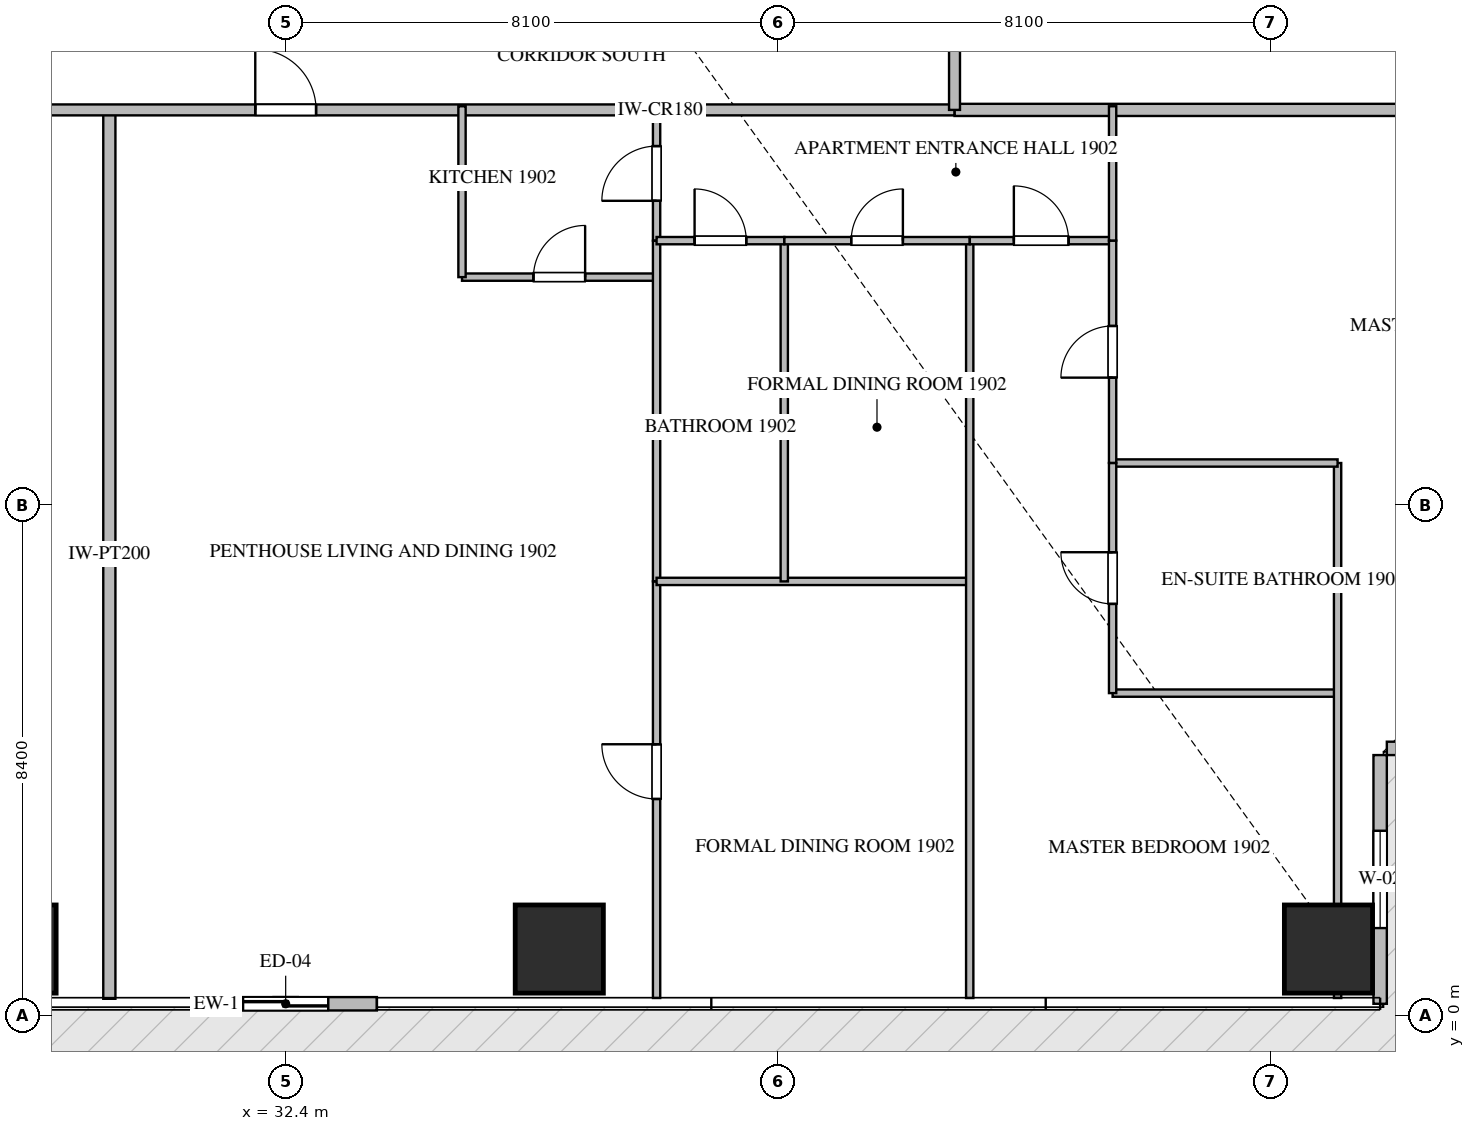
"""IFC4 building model, lengths in metres.
Left out: names, types, materials, properties, quantities, classifications, styles, units other than length and angle.
Written with IfcOpenShell. Run it as: python <this file> out.ifc"""

import sys

from ifc_helpers import new_model, si_unit, direction, frame, frame_2d, origin, origin_2d, place, context, subcontext, project, spatial, rectangle, extrude, source, transform, mapped, element, fill, save


model = new_model("IFC4")
c1 = context("Model", 3, precision=1e-05, world=origin(), true_north=direction((0.0, 1.0)))
c2 = subcontext(c1, "Body", "Model", "MODEL_VIEW")
j1 = project(units=[si_unit("LENGTHUNIT", "METRE"), si_unit("PLANEANGLEUNIT", "RADIAN")], contexts=[c1])
p1 = place(None, origin())
s1 = spatial("IfcSite", under=j1, at=p1, CompositionType="ELEMENT")
p2 = place(p1, origin())
s2 = spatial("IfcBuilding", under=s1, at=p2, CompositionType="ELEMENT")
p3 = place(p2, frame((0.0, 0.0, 79.2)))
s3 = spatial("IfcBuildingStorey", under=s2, at=p3, CompositionType="ELEMENT", Elevation=79.2)
m1 = source(origin(), c2, "Body", "SweptSolid", [
    extrude(rectangle(XDim=1.45, YDim=1.45, at=origin_2d()), origin(), (0.0, 0.0, 1.0), 3.75),
])
for number, where, z_axis, x_axis in (
    (1, (27.9, 1.1, -0.26), (0.0, 0.0, 1.0), (1.0, 0.0, 0.0)),
    (2, (36.9, 1.1, -0.26), (0.0, 0.0, 1.0), (1.0, 0.0, 0.0)),
    (3, (49.55, 1.1, -0.26), (0.0, 0.0, 1.0), (1.0, 0.0, 0.0)),
):
    element("IfcColumn", number, at=place(p3, frame(where, z_axis=z_axis, x_axis=x_axis)), inside=s3, PredefinedType="COLUMN", context=c2, shape_type="MappedRepresentation", body=[
        mapped(m1, transform((0.0, 0.0, 0.0), scale=1.0)),
    ])
p4 = place(p3, frame((30.9, 0.2, 0.0), z_axis=(0.0, 0.0, 1.0), x_axis=(1.0, 0.0, 0.0)))
e4 = element("IfcWall", 4, at=p4, inside=s3, PredefinedType="ELEMENTEDWALL", context=c2, shape_type="SweptSolid", body=[
    extrude(rectangle(XDim=3.0, YDim=0.22, at=frame_2d((1.5, 0.0))), origin(), (0.0, 0.0, 1.0), 3.475),
])
p5 = place(p4, frame((0.8, 0.0, 0.0)))
e5 = element("IfcOpeningElement", 5, at=p5, cuts=e4, PredefinedType="OPENING", context=c2, shape_type="SweptSolid", body=[
    extrude(rectangle(XDim=1.4, YDim=2.25, at=frame_2d((0.7, 1.125))), frame((0.0, 0.12, 0.0), z_axis=(0.0, -1.0, 0.0), x_axis=(1.0, 0.0, 0.0)), (0.0, 0.0, 1.0), 0.24),
])
p6 = place(p3, frame((50.4, 0.2, 0.0), z_axis=(0.0, 0.0, 1.0), x_axis=(0.0, 1.0, 0.0)))
e6 = element("IfcWall", 6, at=p6, inside=s3, PredefinedType="ELEMENTEDWALL", context=c2, shape_type="SweptSolid", body=[
    extrude(rectangle(XDim=4.09, YDim=0.22, at=frame_2d((2.045, 0.0))), origin(), (0.0, 0.0, 1.0), 3.475),
])
p7 = place(p6, frame((1.245, 0.0, 0.65)))
e7 = element("IfcOpeningElement", 7, at=p7, cuts=e6, PredefinedType="OPENING", context=c2, shape_type="SweptSolid", body=[
    extrude(rectangle(XDim=1.6, YDim=2.1, at=frame_2d((0.8, 1.05))), frame((0.0, 0.12, 0.0), z_axis=(0.0, -1.0, 0.0), x_axis=(1.0, 0.0, 0.0)), (0.0, 0.0, 1.0), 0.24),
])
p8 = place(p3, frame((50.51, 4.4, 0.0), z_axis=(0.0, 0.0, 1.0), x_axis=(1.0, 0.0, 0.0)))
e8 = element("IfcWall", 8, at=p8, inside=s3, PredefinedType="ELEMENTEDWALL", context=c2, shape_type="SweptSolid", body=[
    extrude(rectangle(XDim=3.98, YDim=0.22, at=frame_2d((1.99, 0.0))), origin(), (0.0, 0.0, 1.0), 3.475),
])
p9 = place(p8, frame((1.19, 0.0, 0.65)))
e9 = element("IfcOpeningElement", 9, at=p9, cuts=e8, PredefinedType="OPENING", context=c2, shape_type="SweptSolid", body=[
    extrude(rectangle(XDim=1.6, YDim=2.1, at=frame_2d((0.8, 1.05))), frame((0.0, 0.12, 0.0), z_axis=(0.0, -1.0, 0.0), x_axis=(1.0, 0.0, 0.0)), (0.0, 0.0, 1.0), 0.24),
])
p10 = place(p3, frame((29.5, 0.282, 0.0), z_axis=(0.0, 0.0, 1.0), x_axis=(0.0, 1.0, 0.0)))
e10 = element("IfcWall", 10, at=p10, inside=s3, PredefinedType="PARTITIONING", context=c2, shape_type="SweptSolid", body=[
    extrude(rectangle(XDim=14.618, YDim=0.2, at=frame_2d((7.309, 0.0))), origin(), (0.0, 0.0, 1.0), 3.49),
])
p11 = place(p3, frame((43.4, 14.9, 0.0), z_axis=(0.0, 0.0, 1.0), x_axis=(1.0, 0.0, 0.0)))
e11 = element("IfcWall", 11, at=p11, inside=s3, PredefinedType="PARTITIONING", context=c2, shape_type="SweptSolid", body=[
    extrude(rectangle(XDim=15.318, YDim=0.2, at=frame_2d((7.659, 0.0))), origin(), (0.0, 0.0, 1.0), 3.49),
])
p12 = place(p3, frame((21.402, 14.9, 0.0), z_axis=(0.0, 0.0, 1.0), x_axis=(1.0, 0.0, 0.0)))
e12 = element("IfcWall", 12, at=p12, inside=s3, PredefinedType="PARTITIONING", context=c2, shape_type="SweptSolid", body=[
    extrude(rectangle(XDim=21.996, YDim=0.18, at=frame_2d((10.998, 0.0))), origin(), (0.0, 0.0, 1.0), 3.49),
])
p13 = place(p12, frame((4.724, 0.0, 0.0)))
e13 = element("IfcOpeningElement", 13, at=p13, cuts=e12, PredefinedType="OPENING", context=c2, shape_type="SweptSolid", body=[
    extrude(rectangle(XDim=1.0, YDim=2.15, at=frame_2d((0.5, 1.075))), frame((0.0, 0.1, 0.0), z_axis=(0.0, -1.0, 0.0), x_axis=(1.0, 0.0, 0.0)), (0.0, 0.0, 1.0), 0.2),
])
p14 = place(p12, frame((10.498, 0.0, 0.0)))
e14 = element("IfcOpeningElement", 14, at=p14, cuts=e12, PredefinedType="OPENING", context=c2, shape_type="SweptSolid", body=[
    extrude(rectangle(XDim=1.0, YDim=2.15, at=frame_2d((0.5, 1.075))), frame((0.0, 0.1, 0.0), z_axis=(0.0, -1.0, 0.0), x_axis=(1.0, 0.0, 0.0)), (0.0, 0.0, 1.0), 0.2),
])
p15 = place(p3, frame((43.4, 14.9, 0.0), z_axis=(0.0, 0.0, 1.0), x_axis=(0.0, 1.0, 0.0)))
e15 = element("IfcWall", 15, at=p15, inside=s3, PredefinedType="PARTITIONING", context=c2, shape_type="SweptSolid", body=[
    extrude(rectangle(XDim=20.6, YDim=0.18, at=frame_2d((10.3, 0.0))), origin(), (0.0, 0.0, 1.0), 3.49),
])
p16 = place(p15, frame((1.96, 0.0, 0.0)))
e16 = element("IfcOpeningElement", 16, at=p16, cuts=e15, PredefinedType="OPENING", context=c2, shape_type="SweptSolid", body=[
    extrude(rectangle(XDim=1.0, YDim=2.15, at=frame_2d((0.5, 1.075))), frame((0.0, 0.1, 0.0), z_axis=(0.0, -1.0, 0.0), x_axis=(1.0, 0.0, 0.0)), (0.0, 0.0, 1.0), 0.2),
])
p17 = place(p3, frame((35.3, 12.15, 0.0), z_axis=(0.0, 0.0, 1.0), x_axis=(1.0, 0.0, 0.0)))
e17 = element("IfcWall", 17, at=p17, inside=s3, PredefinedType="PARTITIONING", context=c2, shape_type="SweptSolid", body=[
    extrude(rectangle(XDim=3.2, YDim=0.12, at=frame_2d((1.6, 0.0))), origin(), (0.0, 0.0, 1.0), 3.49),
])
p18 = place(p17, frame((1.175, 0.0, 0.0)))
e18 = element("IfcOpeningElement", 18, at=p18, cuts=e17, PredefinedType="OPENING", context=c2, shape_type="SweptSolid", body=[
    extrude(rectangle(XDim=0.85, YDim=2.1, at=frame_2d((0.425, 1.05))), frame((0.0, 0.07, 0.0), z_axis=(0.0, -1.0, 0.0), x_axis=(1.0, 0.0, 0.0)), (0.0, 0.0, 1.0), 0.14),
])
p19 = place(p3, frame((35.3, 12.15, 0.0), z_axis=(0.0, 0.0, 1.0), x_axis=(0.0, 1.0, 0.0)))
e19 = element("IfcWall", 19, at=p19, inside=s3, PredefinedType="PARTITIONING", context=c2, shape_type="SweptSolid", body=[
    extrude(rectangle(XDim=2.81, YDim=0.12, at=frame_2d((1.405, 0.0))), origin(), (0.0, 0.0, 1.0), 3.49),
])
p20 = place(p3, frame((38.5, 12.75, 0.0), z_axis=(0.0, 0.0, 1.0), x_axis=(0.0, 1.0, 0.0)))
e20 = element("IfcWall", 20, at=p20, inside=s3, PredefinedType="PARTITIONING", context=c2, shape_type="SweptSolid", body=[
    extrude(rectangle(XDim=2.21, YDim=0.12, at=frame_2d((1.105, 0.0))), origin(), (0.0, 0.0, 1.0), 3.49),
])
p21 = place(p20, frame((0.655, 0.0, 0.0)))
e21 = element("IfcOpeningElement", 21, at=p21, cuts=e20, PredefinedType="OPENING", context=c2, shape_type="SweptSolid", body=[
    extrude(rectangle(XDim=0.9, YDim=2.1, at=frame_2d((0.45, 1.05))), frame((0.0, 0.07, 0.0), z_axis=(0.0, -1.0, 0.0), x_axis=(1.0, 0.0, 0.0)), (0.0, 0.0, 1.0), 0.14),
])
p22 = place(p3, frame((38.5, 0.295, 0.0), z_axis=(0.0, 0.0, 1.0), x_axis=(0.0, 1.0, 0.0)))
e22 = element("IfcWall", 22, at=p22, inside=s3, PredefinedType="PARTITIONING", context=c2, shape_type="SweptSolid", body=[
    extrude(rectangle(XDim=6.851, YDim=0.12, at=frame_2d((3.426, 0.0))), origin(), (0.0, 0.0, 1.0), 3.49),
])
p23 = place(p22, frame((3.273, 0.0, 0.0)))
e23 = element("IfcOpeningElement", 23, at=p23, cuts=e22, PredefinedType="OPENING", context=c2, shape_type="SweptSolid", body=[
    extrude(rectangle(XDim=0.9, YDim=2.1, at=frame_2d((0.45, 1.05))), frame((0.0, 0.07, 0.0), z_axis=(0.0, -1.0, 0.0), x_axis=(1.0, 0.0, 0.0)), (0.0, 0.0, 1.0), 0.14),
])
p24 = place(p3, frame((38.5, 7.148, 0.0), z_axis=(0.0, 0.0, 1.0), x_axis=(0.0, 1.0, 0.0)))
e24 = element("IfcWall", 24, at=p24, inside=s3, PredefinedType="PARTITIONING", context=c2, shape_type="SweptSolid", body=[
    extrude(rectangle(XDim=5.6, YDim=0.12, at=frame_2d((2.8, 0.0))), origin(), (0.0, 0.0, 1.0), 3.49),
])
p25 = place(p3, frame((38.5, 7.146, 0.0), z_axis=(0.0, 0.0, 1.0), x_axis=(1.0, 0.0, 0.0)))
e25 = element("IfcWall", 25, at=p25, inside=s3, PredefinedType="PARTITIONING", context=c2, shape_type="SweptSolid", body=[
    extrude(rectangle(XDim=5.15, YDim=0.12, at=frame_2d((2.575, 0.0))), origin(), (0.0, 0.0, 1.0), 3.49),
])
p26 = place(p3, frame((43.65, 0.295, 0.0), z_axis=(0.0, 0.0, 1.0), x_axis=(0.0, 1.0, 0.0)))
e26 = element("IfcWall", 26, at=p26, inside=s3, PredefinedType="PARTITIONING", context=c2, shape_type="SweptSolid", body=[
    extrude(rectangle(XDim=12.455, YDim=0.12, at=frame_2d((6.228, 0.0))), origin(), (0.0, 0.0, 1.0), 3.49),
])
p27 = place(p3, frame((40.6, 7.146, 0.0), z_axis=(0.0, 0.0, 1.0), x_axis=(0.0, 1.0, 0.0)))
e27 = element("IfcWall", 27, at=p27, inside=s3, PredefinedType="PARTITIONING", context=c2, shape_type="SweptSolid", body=[
    extrude(rectangle(XDim=5.604, YDim=0.12, at=frame_2d((2.802, 0.0))), origin(), (0.0, 0.0, 1.0), 3.49),
])
p28 = place(p3, frame((38.5, 12.75, 0.0), z_axis=(0.0, 0.0, 1.0), x_axis=(1.0, 0.0, 0.0)))
e28 = element("IfcWall", 28, at=p28, inside=s3, PredefinedType="PARTITIONING", context=c2, shape_type="SweptSolid", body=[
    extrude(rectangle(XDim=2.1, YDim=0.12, at=frame_2d((1.05, 0.0))), origin(), (0.0, 0.0, 1.0), 3.49),
])
p29 = place(p28, frame((0.625, 0.0, 0.0)))
e29 = element("IfcOpeningElement", 29, at=p29, cuts=e28, PredefinedType="OPENING", context=c2, shape_type="SweptSolid", body=[
    extrude(rectangle(XDim=0.85, YDim=2.1, at=frame_2d((0.425, 1.05))), frame((0.0, 0.07, 0.0), z_axis=(0.0, -1.0, 0.0), x_axis=(1.0, 0.0, 0.0)), (0.0, 0.0, 1.0), 0.14),
])
p30 = place(p3, frame((40.602, 12.75, 0.0), z_axis=(0.0, 0.0, 1.0), x_axis=(1.0, 0.0, 0.0)))
e30 = element("IfcWall", 30, at=p30, inside=s3, PredefinedType="PARTITIONING", context=c2, shape_type="SweptSolid", body=[
    extrude(rectangle(XDim=3.048, YDim=0.12, at=frame_2d((1.524, 0.0))), origin(), (0.0, 0.0, 1.0), 3.49),
])
p31 = place(p30, frame((1.099, 0.0, 0.0)))
e31 = element("IfcOpeningElement", 31, at=p31, cuts=e30, PredefinedType="OPENING", context=c2, shape_type="SweptSolid", body=[
    extrude(rectangle(XDim=0.85, YDim=2.1, at=frame_2d((0.425, 1.05))), frame((0.0, 0.07, 0.0), z_axis=(0.0, -1.0, 0.0), x_axis=(1.0, 0.0, 0.0)), (0.0, 0.0, 1.0), 0.14),
])
p32 = place(p3, frame((43.652, 12.75, 0.0), z_axis=(0.0, 0.0, 1.0), x_axis=(1.0, 0.0, 0.0)))
e32 = element("IfcWall", 32, at=p32, inside=s3, PredefinedType="PARTITIONING", context=c2, shape_type="SweptSolid", body=[
    extrude(rectangle(XDim=2.348, YDim=0.12, at=frame_2d((1.174, 0.0))), origin(), (0.0, 0.0, 1.0), 3.49),
])
p33 = place(p32, frame((0.724, 0.0, 0.0)))
e33 = element("IfcOpeningElement", 33, at=p33, cuts=e32, PredefinedType="OPENING", context=c2, shape_type="SweptSolid", body=[
    extrude(rectangle(XDim=0.9, YDim=2.1, at=frame_2d((0.45, 1.05))), frame((0.0, 0.07, 0.0), z_axis=(0.0, -1.0, 0.0), x_axis=(1.0, 0.0, 0.0)), (0.0, 0.0, 1.0), 0.14),
])
p34 = place(p3, frame((46.0, 5.309, 0.0), z_axis=(0.0, 0.0, 1.0), x_axis=(1.0, 0.0, 0.0)))
e34 = element("IfcWall", 34, at=p34, inside=s3, PredefinedType="PARTITIONING", context=c2, shape_type="SweptSolid", body=[
    extrude(rectangle(XDim=3.7, YDim=0.12, at=frame_2d((1.85, 0.0))), origin(), (0.0, 0.0, 1.0), 3.49),
])
p35 = place(p3, frame((49.7, 0.295, 0.0), z_axis=(0.0, 0.0, 1.0), x_axis=(0.0, 1.0, 0.0)))
e35 = element("IfcWall", 35, at=p35, inside=s3, PredefinedType="PARTITIONING", context=c2, shape_type="SweptSolid", body=[
    extrude(rectangle(XDim=8.798, YDim=0.12, at=frame_2d((4.399, 0.0))), origin(), (0.0, 0.0, 1.0), 2.922),
])
p36 = place(p3, frame((46.0, 9.093, 0.0), z_axis=(0.0, 0.0, 1.0), x_axis=(1.0, 0.0, 0.0)))
e36 = element("IfcWall", 36, at=p36, inside=s3, PredefinedType="PARTITIONING", context=c2, shape_type="SweptSolid", body=[
    extrude(rectangle(XDim=3.7, YDim=0.12, at=frame_2d((1.85, 0.0))), origin(), (0.0, 0.0, 1.0), 3.49),
])
p37 = place(p3, frame((46.0, 5.309, 0.0), z_axis=(0.0, 0.0, 1.0), x_axis=(0.0, 1.0, 0.0)))
e37 = element("IfcWall", 37, at=p37, inside=s3, PredefinedType="PARTITIONING", context=c2, shape_type="SweptSolid", body=[
    extrude(rectangle(XDim=3.784, YDim=0.12, at=frame_2d((1.892, 0.0))), origin(), (0.0, 0.0, 1.0), 3.49),
])
p38 = place(p37, frame((1.467, 0.0, 0.0)))
e38 = element("IfcOpeningElement", 38, at=p38, cuts=e37, PredefinedType="OPENING", context=c2, shape_type="SweptSolid", body=[
    extrude(rectangle(XDim=0.85, YDim=2.1, at=frame_2d((0.425, 1.05))), frame((0.0, 0.07, 0.0), z_axis=(0.0, -1.0, 0.0), x_axis=(1.0, 0.0, 0.0)), (0.0, 0.0, 1.0), 0.14),
])
p39 = place(p3, frame((46.0, 9.095, 0.0), z_axis=(0.0, 0.0, 1.0), x_axis=(0.0, 1.0, 0.0)))
e39 = element("IfcWall", 39, at=p39, inside=s3, PredefinedType="PARTITIONING", context=c2, shape_type="SweptSolid", body=[
    extrude(rectangle(XDim=3.655, YDim=0.12, at=frame_2d((1.828, 0.0))), origin(), (0.0, 0.0, 1.0), 3.49),
])
p40 = place(p39, frame((1.402, 0.0, 0.0)))
e40 = element("IfcOpeningElement", 40, at=p40, cuts=e39, PredefinedType="OPENING", context=c2, shape_type="SweptSolid", body=[
    extrude(rectangle(XDim=0.85, YDim=2.1, at=frame_2d((0.425, 1.05))), frame((0.0, 0.07, 0.0), z_axis=(0.0, -1.0, 0.0), x_axis=(1.0, 0.0, 0.0)), (0.0, 0.0, 1.0), 0.14),
])
p41 = place(p3, frame((46.0, 12.752, 0.0), z_axis=(0.0, 0.0, 1.0), x_axis=(0.0, 1.0, 0.0)))
e41 = element("IfcWall", 41, at=p41, inside=s3, PredefinedType="PARTITIONING", context=c2, shape_type="SweptSolid", body=[
    extrude(rectangle(XDim=2.208, YDim=0.12, at=frame_2d((1.104, 0.0))), origin(), (0.0, 0.0, 1.0), 3.49),
])
m2 = source(origin(), c2, "Body", "SweptSolid", [
    extrude(rectangle(XDim=1.4, YDim=2.25, at=frame_2d((0.7, 1.125))), frame((0.0, 0.025, 0.0), z_axis=(0.0, -1.0, 0.0), x_axis=(1.0, 0.0, 0.0)), (0.0, 0.0, 1.0), 0.05),
])
p42 = place(p5, origin())
e42 = element("IfcDoor", 42, at=p42, inside=s3, OperationType="SLIDING_TO_LEFT", PredefinedType="DOOR", context=c2, shape_type="MappedRepresentation", body=[
    mapped(m2, transform((0.0, 0.0, 0.0), scale=1.0)),
])
fill(e5, e42)
m3 = source(origin(), c2, "Body", "SweptSolid", [
    extrude(rectangle(XDim=1.6, YDim=2.1, at=frame_2d((0.8, 1.05))), frame((0.0, 0.03, 0.0), z_axis=(0.0, -1.0, 0.0), x_axis=(1.0, 0.0, 0.0)), (0.0, 0.0, 1.0), 0.06),
])
p43 = place(p7, origin())
e43 = element("IfcWindow", 43, at=p43, inside=s3, PartitioningType="SINGLE_PANEL", PredefinedType="WINDOW", context=c2, shape_type="MappedRepresentation", body=[
    mapped(m3, transform((0.0, 0.0, 0.0), scale=1.0)),
])
fill(e7, e43)
m4 = source(origin(), c2, "Body", "SweptSolid", [
    extrude(rectangle(XDim=1.0, YDim=2.15, at=frame_2d((0.5, 1.075))), frame((0.0, 0.025, 0.0), z_axis=(0.0, -1.0, 0.0), x_axis=(1.0, 0.0, 0.0)), (0.0, 0.0, 1.0), 0.05),
])
p44 = place(p14, origin())
e44 = element("IfcDoor", 44, at=p44, inside=s3, OperationType="SINGLE_SWING_LEFT", PredefinedType="DOOR", context=c2, shape_type="MappedRepresentation", body=[
    mapped(m4, transform((0.0, 0.0, 0.0), scale=1.0)),
])
fill(e14, e44)
m5 = source(origin(), c2, "Body", "SweptSolid", [
    extrude(rectangle(XDim=0.85, YDim=2.1, at=frame_2d((0.425, 1.05))), frame((0.0, 0.025, 0.0), z_axis=(0.0, -1.0, 0.0), x_axis=(1.0, 0.0, 0.0)), (0.0, 0.0, 1.0), 0.05),
])
p45 = place(p18, origin())
e45 = element("IfcDoor", 45, at=p45, inside=s3, OperationType="SINGLE_SWING_RIGHT", PredefinedType="DOOR", context=c2, shape_type="MappedRepresentation", body=[
    mapped(m5, transform((0.0, 0.0, 0.0), scale=1.0)),
])
fill(e18, e45)
m6 = source(origin(), c2, "Body", "SweptSolid", [
    extrude(rectangle(XDim=0.9, YDim=2.1, at=frame_2d((0.45, 1.05))), frame((0.0, 0.025, 0.0), z_axis=(0.0, -1.0, 0.0), x_axis=(1.0, 0.0, 0.0)), (0.0, 0.0, 1.0), 0.05),
])
p46 = place(p21, origin())
e46 = element("IfcDoor", 46, at=p46, inside=s3, OperationType="SINGLE_SWING_LEFT", PredefinedType="DOOR", context=c2, shape_type="MappedRepresentation", body=[
    mapped(m6, transform((0.0, 0.0, 0.0), scale=1.0)),
])
fill(e21, e46)
p47 = place(p23, origin())
e47 = element("IfcDoor", 47, at=p47, inside=s3, OperationType="SINGLE_SWING_RIGHT", PredefinedType="DOOR", context=c2, shape_type="MappedRepresentation", body=[
    mapped(m6, transform((0.0, 0.0, 0.0), scale=1.0)),
])
fill(e23, e47)
p48 = place(p29, origin())
e48 = element("IfcDoor", 48, at=p48, inside=s3, OperationType="SINGLE_SWING_LEFT", PredefinedType="DOOR", context=c2, shape_type="MappedRepresentation", body=[
    mapped(m5, transform((0.0, 0.0, 0.0), scale=1.0)),
])
fill(e29, e48)
p49 = place(p31, origin())
e49 = element("IfcDoor", 49, at=p49, inside=s3, OperationType="SINGLE_SWING_RIGHT", PredefinedType="DOOR", context=c2, shape_type="MappedRepresentation", body=[
    mapped(m5, transform((0.0, 0.0, 0.0), scale=1.0)),
])
fill(e31, e49)
p50 = place(p33, origin())
e50 = element("IfcDoor", 50, at=p50, inside=s3, OperationType="SINGLE_SWING_LEFT", PredefinedType="DOOR", context=c2, shape_type="MappedRepresentation", body=[
    mapped(m6, transform((0.0, 0.0, 0.0), scale=1.0)),
])
fill(e33, e50)
p51 = place(p38, origin())
e51 = element("IfcDoor", 51, at=p51, inside=s3, OperationType="SINGLE_SWING_RIGHT", PredefinedType="DOOR", context=c2, shape_type="MappedRepresentation", body=[
    mapped(m5, transform((0.0, 0.0, 0.0), scale=1.0)),
])
fill(e38, e51)
p52 = place(p40, origin())
e52 = element("IfcDoor", 52, at=p52, inside=s3, OperationType="SINGLE_SWING_LEFT", PredefinedType="DOOR", context=c2, shape_type="MappedRepresentation", body=[
    mapped(m5, transform((0.0, 0.0, 0.0), scale=1.0)),
])
fill(e40, e52)
save(model, sys.argv[1])
